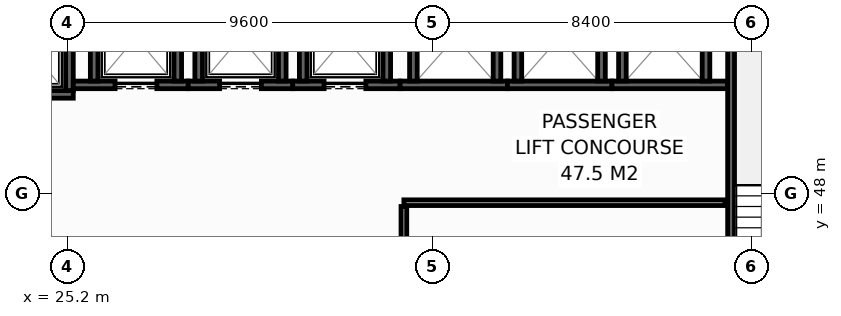
"""IFC4 building model, lengths in metres.
Left out: names, types, materials, properties, quantities, classifications, styles, units other than length and angle.
Written with IfcOpenShell. Run it as: python <this file> out.ifc"""

import sys

from ifc_helpers import new_model, si_unit, direction, frame, frame_2d, origin, place, context, subcontext, project, spatial, rectangle, extrude, element, fill, save


model = new_model("IFC4")
c1 = context("Model", 3, precision=1e-05, world=origin(), true_north=direction((0.0, 1.0)))
c2 = subcontext(c1, "Body", "Model", "MODEL_VIEW")
j1 = project(units=[si_unit("LENGTHUNIT", "METRE"), si_unit("PLANEANGLEUNIT", "RADIAN")], contexts=[c1])
p1 = place(None, origin())
s1 = spatial("IfcSite", under=j1, at=p1, CompositionType="ELEMENT")
p2 = place(p1, origin())
s2 = spatial("IfcBuilding", under=s1, at=p2, CompositionType="ELEMENT")
p3 = place(p2, frame((0.0, 0.0, 78.0)))
s3 = spatial("IfcBuildingStorey", under=s2, at=p3, CompositionType="ELEMENT", Elevation=78.0)
p4 = place(p3, frame((22.5, 50.6, 0.0), z_axis=(0.0, 0.0, 1.0), x_axis=(1.0, 0.0, 0.0)))
e1 = element("IfcWall", 1, at=p4, inside=s3, PredefinedType="SHEAR", context=c2, shape_type="SweptSolid", body=[
    extrude(rectangle(XDim=2.85, YDim=0.2, at=frame_2d((1.425, 0.0))), origin(), (0.0, 0.0, 1.0), 4.15),
])
p5 = place(p4, frame((0.925, 0.0, 0.0)))
e2 = element("IfcOpeningElement", 2, at=p5, cuts=e1, PredefinedType="OPENING", context=c2, shape_type="SweptSolid", body=[
    extrude(rectangle(XDim=1.25, YDim=2.3, at=frame_2d((0.625, 1.15))), frame((0.0, 0.11, 0.0), z_axis=(0.0, -1.0, 0.0), x_axis=(1.0, 0.0, 0.0)), (0.0, 0.0, 1.0), 0.22),
])
p6 = place(p3, frame((25.25, 50.7, 0.0), z_axis=(0.0, 0.0, 1.0), x_axis=(0.0, 1.0, 0.0)))
e3 = element("IfcWall", 3, at=p6, inside=s3, PredefinedType="SHEAR", context=c2, shape_type="SweptSolid", body=[
    extrude(rectangle(XDim=2.6, YDim=0.2, at=frame_2d((1.3, 0.0))), origin(), (0.0, 0.0, 1.0), 4.15),
])
p7 = place(p3, frame((25.35, 50.85, 0.0), z_axis=(0.0, 0.0, 1.0), x_axis=(1.0, 0.0, 0.0)))
e4 = element("IfcWall", 4, at=p7, inside=s3, PredefinedType="SHEAR", context=c2, shape_type="SweptSolid", body=[
    extrude(rectangle(XDim=3.025, YDim=0.2, at=frame_2d((1.512, 0.0))), origin(), (0.0, 0.0, 1.0), 4.15),
])
p8 = place(p7, frame((1.1, 0.0, 0.0)))
e5 = element("IfcOpeningElement", 5, at=p8, cuts=e4, PredefinedType="OPENING", context=c2, shape_type="SweptSolid", body=[
    extrude(rectangle(XDim=1.1, YDim=2.2, at=frame_2d((0.55, 1.1))), frame((0.0, 0.11, 0.0), z_axis=(0.0, -1.0, 0.0), x_axis=(1.0, 0.0, 0.0)), (0.0, 0.0, 1.0), 0.22),
])
for number, where, z_axis, x_axis in (
    (6, (25.9, 50.95, 0.0), (0.0, 0.0, 1.0), (0.0, 1.0, 0.0)),
    (7, (28.1, 50.95, 0.0), (0.0, 0.0, 1.0), (0.0, 1.0, 0.0)),
):
    element("IfcWall", number, at=place(p3, frame(where, z_axis=z_axis, x_axis=x_axis)), inside=s3, PredefinedType="SHEAR", context=c2, shape_type="SweptSolid", body=[
        extrude(rectangle(XDim=2.3, YDim=0.2, at=frame_2d((1.15, 0.0))), origin(), (0.0, 0.0, 1.0), 4.15),
    ])
p9 = place(p3, frame((28.375, 50.85, 0.0), z_axis=(0.0, 0.0, 1.0), x_axis=(1.0, 0.0, 0.0)))
e8 = element("IfcWall", 8, at=p9, inside=s3, PredefinedType="SHEAR", context=c2, shape_type="SweptSolid", body=[
    extrude(rectangle(XDim=2.75, YDim=0.2, at=frame_2d((1.375, 0.0))), origin(), (0.0, 0.0, 1.0), 4.15),
])
p10 = place(p9, frame((0.825, 0.0, 0.0)))
e9 = element("IfcOpeningElement", 9, at=p10, cuts=e8, PredefinedType="OPENING", context=c2, shape_type="SweptSolid", body=[
    extrude(rectangle(XDim=1.1, YDim=2.2, at=frame_2d((0.55, 1.1))), frame((0.0, 0.11, 0.0), z_axis=(0.0, -1.0, 0.0), x_axis=(1.0, 0.0, 0.0)), (0.0, 0.0, 1.0), 0.22),
])
for number, where, z_axis, x_axis in (
    (10, (28.65, 50.95, 0.0), (0.0, 0.0, 1.0), (0.0, 1.0, 0.0)),
    (11, (30.85, 50.95, 0.0), (0.0, 0.0, 1.0), (0.0, 1.0, 0.0)),
):
    element("IfcWall", number, at=place(p3, frame(where, z_axis=z_axis, x_axis=x_axis)), inside=s3, PredefinedType="SHEAR", context=c2, shape_type="SweptSolid", body=[
        extrude(rectangle(XDim=2.3, YDim=0.2, at=frame_2d((1.15, 0.0))), origin(), (0.0, 0.0, 1.0), 4.15),
    ])
p11 = place(p3, frame((31.125, 50.85, 0.0), z_axis=(0.0, 0.0, 1.0), x_axis=(1.0, 0.0, 0.0)))
e12 = element("IfcWall", 12, at=p11, inside=s3, PredefinedType="SHEAR", context=c2, shape_type="SweptSolid", body=[
    extrude(rectangle(XDim=2.825, YDim=0.2, at=frame_2d((1.413, 0.0))), origin(), (0.0, 0.0, 1.0), 4.15),
])
p12 = place(p11, frame((0.825, 0.0, 0.0)))
e13 = element("IfcOpeningElement", 13, at=p12, cuts=e12, PredefinedType="OPENING", context=c2, shape_type="SweptSolid", body=[
    extrude(rectangle(XDim=1.1, YDim=2.2, at=frame_2d((0.55, 1.1))), frame((0.0, 0.11, 0.0), z_axis=(0.0, -1.0, 0.0), x_axis=(1.0, 0.0, 0.0)), (0.0, 0.0, 1.0), 0.22),
])
for number, where, z_axis, x_axis in (
    (14, (31.4, 50.95, 0.0), (0.0, 0.0, 1.0), (0.0, 1.0, 0.0)),
    (15, (33.6, 50.95, 0.0), (0.0, 0.0, 1.0), (0.0, 1.0, 0.0)),
):
    element("IfcWall", number, at=place(p3, frame(where, z_axis=z_axis, x_axis=x_axis)), inside=s3, PredefinedType="SHEAR", context=c2, shape_type="SweptSolid", body=[
        extrude(rectangle(XDim=2.3, YDim=0.2, at=frame_2d((1.15, 0.0))), origin(), (0.0, 0.0, 1.0), 4.15),
    ])
p13 = place(p3, frame((33.95, 50.85, 0.0), z_axis=(0.0, 0.0, 1.0), x_axis=(1.0, 0.0, 0.0)))
e16 = element("IfcWall", 16, at=p13, inside=s3, PredefinedType="SHEAR", context=c2, shape_type="SweptSolid", body=[
    extrude(rectangle(XDim=2.825, YDim=0.2, at=frame_2d((1.413, 0.0))), origin(), (0.0, 0.0, 1.0), 4.15),
])
for number, where, z_axis, x_axis in (
    (17, (34.3, 50.95, 0.0), (0.0, 0.0, 1.0), (0.0, 1.0, 0.0)),
    (18, (36.5, 50.95, 0.0), (0.0, 0.0, 1.0), (0.0, 1.0, 0.0)),
):
    element("IfcWall", number, at=place(p3, frame(where, z_axis=z_axis, x_axis=x_axis)), inside=s3, PredefinedType="SHEAR", context=c2, shape_type="SweptSolid", body=[
        extrude(rectangle(XDim=2.3, YDim=0.2, at=frame_2d((1.15, 0.0))), origin(), (0.0, 0.0, 1.0), 4.15),
    ])
p14 = place(p3, frame((36.775, 50.85, 0.0), z_axis=(0.0, 0.0, 1.0), x_axis=(1.0, 0.0, 0.0)))
e19 = element("IfcWall", 19, at=p14, inside=s3, PredefinedType="SHEAR", context=c2, shape_type="SweptSolid", body=[
    extrude(rectangle(XDim=2.75, YDim=0.2, at=frame_2d((1.375, 0.0))), origin(), (0.0, 0.0, 1.0), 4.15),
])
for number, where, z_axis, x_axis in (
    (20, (37.05, 50.95, 0.0), (0.0, 0.0, 1.0), (0.0, 1.0, 0.0)),
    (21, (39.25, 50.95, 0.0), (0.0, 0.0, 1.0), (0.0, 1.0, 0.0)),
):
    element("IfcWall", number, at=place(p3, frame(where, z_axis=z_axis, x_axis=x_axis)), inside=s3, PredefinedType="SHEAR", context=c2, shape_type="SweptSolid", body=[
        extrude(rectangle(XDim=2.3, YDim=0.2, at=frame_2d((1.15, 0.0))), origin(), (0.0, 0.0, 1.0), 4.15),
    ])
p15 = place(p3, frame((39.525, 50.85, 0.0), z_axis=(0.0, 0.0, 1.0), x_axis=(1.0, 0.0, 0.0)))
e22 = element("IfcWall", 22, at=p15, inside=s3, PredefinedType="SHEAR", context=c2, shape_type="SweptSolid", body=[
    extrude(rectangle(XDim=3.045, YDim=0.2, at=frame_2d((1.522, 0.0))), origin(), (0.0, 0.0, 1.0), 4.15),
])
for number, where, z_axis, x_axis in (
    (23, (39.8, 50.95, 0.0), (0.0, 0.0, 1.0), (0.0, 1.0, 0.0)),
    (24, (42.0, 50.95, 0.0), (0.0, 0.0, 1.0), (0.0, 1.0, 0.0)),
):
    element("IfcWall", number, at=place(p3, frame(where, z_axis=z_axis, x_axis=x_axis)), inside=s3, PredefinedType="SHEAR", context=c2, shape_type="SweptSolid", body=[
        extrude(rectangle(XDim=2.3, YDim=0.2, at=frame_2d((1.15, 0.0))), origin(), (0.0, 0.0, 1.0), 4.15),
    ])
p16 = place(p3, frame((42.66, 53.8, 0.0), z_axis=(0.0, 0.0, 1.0), x_axis=(0.0, -1.0, 0.0)))
e25 = element("IfcWall", 25, at=p16, inside=s3, PredefinedType="SHEAR", context=c2, shape_type="SweptSolid", body=[
    extrude(rectangle(XDim=10.4, YDim=0.18, at=frame_2d((5.2, 0.0))), origin(), (0.0, 0.0, 1.0), 4.15),
])
p17 = place(p16, frame((8.99, 0.0, 0.0)))
e26 = element("IfcOpeningElement", 26, at=p17, cuts=e25, PredefinedType="OPENING", context=c2, shape_type="SweptSolid", body=[
    extrude(rectangle(XDim=1.1, YDim=2.15, at=frame_2d((0.55, 1.075))), frame((0.0, 0.1, 0.0), z_axis=(0.0, -1.0, 0.0), x_axis=(1.0, 0.0, 0.0)), (0.0, 0.0, 1.0), 0.2),
])
p18 = place(p3, frame((34.05, 47.75, 0.0), z_axis=(0.0, 0.0, 1.0), x_axis=(1.0, 0.0, 0.0)))
e27 = element("IfcWall", 27, at=p18, inside=s3, PredefinedType="PARTITIONING", context=c2, shape_type="SweptSolid", body=[
    extrude(rectangle(XDim=8.45, YDim=0.15, at=frame_2d((4.225, 0.0))), origin(), (0.0, 0.0, 1.0), 4.15),
])
p19 = place(p3, frame((34.05, 45.22, 0.0), z_axis=(0.0, 0.0, 1.0), x_axis=(0.0, 1.0, 0.0)))
e28 = element("IfcWall", 28, at=p19, inside=s3, PredefinedType="PARTITIONING", context=c2, shape_type="SweptSolid", body=[
    extrude(rectangle(XDim=2.43, YDim=0.15, at=frame_2d((1.215, 0.0))), origin(), (0.0, 0.0, 1.0), 4.15),
])
p20 = place(p8, origin())
e29 = element("IfcDoor", 29, at=p20, inside=s3, OperationType="SLIDING_TO_LEFT", PredefinedType="DOOR", context=c2, shape_type="SweptSolid", body=[
    extrude(rectangle(XDim=1.1, YDim=2.2, at=frame_2d((0.55, 1.1))), frame((0.0, 0.025, 0.0), z_axis=(0.0, -1.0, 0.0), x_axis=(1.0, 0.0, 0.0)), (0.0, 0.0, 1.0), 0.05),
])
fill(e5, e29)
p21 = place(p10, origin())
e30 = element("IfcDoor", 30, at=p21, inside=s3, OperationType="SLIDING_TO_LEFT", PredefinedType="DOOR", context=c2, shape_type="SweptSolid", body=[
    extrude(rectangle(XDim=1.1, YDim=2.2, at=frame_2d((0.55, 1.1))), frame((0.0, 0.025, 0.0), z_axis=(0.0, -1.0, 0.0), x_axis=(1.0, 0.0, 0.0)), (0.0, 0.0, 1.0), 0.05),
])
fill(e9, e30)
p22 = place(p12, origin())
e31 = element("IfcDoor", 31, at=p22, inside=s3, OperationType="SLIDING_TO_LEFT", PredefinedType="DOOR", context=c2, shape_type="SweptSolid", body=[
    extrude(rectangle(XDim=1.1, YDim=2.2, at=frame_2d((0.55, 1.1))), frame((0.0, 0.025, 0.0), z_axis=(0.0, -1.0, 0.0), x_axis=(1.0, 0.0, 0.0)), (0.0, 0.0, 1.0), 0.05),
])
fill(e13, e31)
save(model, sys.argv[1])
